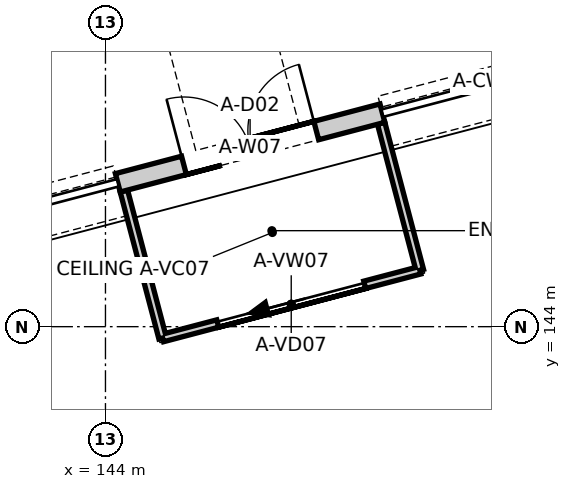
"""IFC4 building model, lengths in metres.
Left out: names, types, materials, properties, quantities, classifications, styles, units other than length and angle.
Written with IfcOpenShell. Run it as: python <this file> out.ifc"""

import sys

from ifc_helpers import new_model, si_unit, direction, frame, frame_2d, origin, place, context, subcontext, project, spatial, polyline, rectangle, outline, extrude, element, fill, save


model = new_model("IFC4")
c1 = context("Model", 3, precision=1e-05, world=origin(), true_north=direction((0.0, 1.0)))
c2 = subcontext(c1, "Body", "Model", "MODEL_VIEW")
j1 = project(units=[si_unit("LENGTHUNIT", "METRE"), si_unit("PLANEANGLEUNIT", "RADIAN")], contexts=[c1])
p1 = place(None, origin())
s1 = spatial("IfcSite", under=j1, at=p1, CompositionType="ELEMENT")
p2 = place(p1, origin())
s2 = spatial("IfcBuilding", under=s1, at=p2, CompositionType="ELEMENT")
p3 = place(p2, origin())
s3 = spatial("IfcBuildingStorey", under=s2, at=p3, CompositionType="ELEMENT", Elevation=0.0)
p4 = place(p3, frame((147.644, 146.809, 0.0), z_axis=(0.0, 0.0, 1.0), x_axis=(-0.967051693888, -0.254580088279, 0.0)))
e1 = element("IfcWall", 1, at=p4, inside=s3, PredefinedType="SOLIDWALL", context=c2, shape_type="SweptSolid", body=[
    extrude(rectangle(XDim=3.6, YDim=0.25, at=frame_2d((1.8, 0.0))), origin(), (0.0, 0.0, 1.0), 4.338),
])
p5 = place(p4, frame((0.9, 0.0, 0.0)))
e2 = element("IfcOpeningElement", 2, at=p5, cuts=e1, PredefinedType="OPENING", context=c2, shape_type="SweptSolid", body=[
    extrude(rectangle(XDim=1.8, YDim=2.4, at=frame_2d((0.9, 1.2))), frame((0.0, 0.135, 0.0), z_axis=(0.0, -1.0, 0.0), x_axis=(1.0, 0.0, 0.0)), (0.0, 0.0, 1.0), 0.27),
])
p6 = place(p3, frame((147.627, 146.676, 0.0), z_axis=(0.0, 0.0, 1.0), x_axis=(0.254637503204, -0.967036577365, 0.0)))
e3 = element("IfcWall", 3, at=p6, inside=s3, PredefinedType="PARTITIONING", context=c2, shape_type="SweptSolid", body=[
    extrude(outline(polyline([(0.0, -0.05), (1.95, -0.05), (2.05, 0.05), (0.0, 0.05), (0.0, -0.05)])), origin(), (0.0, 0.0, 1.0), 3.0),
])
p7 = place(p3, frame((148.136, 144.741, 0.0), z_axis=(0.0, 0.0, 1.0), x_axis=(-0.967047425918, -0.254596300101, 0.0)))
e4 = element("IfcWall", 4, at=p7, inside=s3, PredefinedType="PARTITIONING", context=c2, shape_type="SweptSolid", body=[
    extrude(outline(polyline([(0.05, -0.05), (3.45, -0.05), (3.55, 0.05), (-0.05, 0.05), (0.05, -0.05)])), origin(), (0.0, 0.0, 1.0), 3.0),
])
p8 = place(p7, frame((0.75, 0.0, 0.0)))
e5 = element("IfcOpeningElement", 5, at=p8, cuts=e4, PredefinedType="OPENING", context=c2, shape_type="SweptSolid", body=[
    extrude(rectangle(XDim=2.0, YDim=2.4, at=frame_2d((1.0, 1.2))), frame((0.0, 0.06, 0.0), z_axis=(0.0, -1.0, 0.0), x_axis=(1.0, 0.0, 0.0)), (0.0, 0.0, 1.0), 0.12),
])
p9 = place(p3, frame((144.752, 143.85, 0.0), z_axis=(0.0, 0.0, 1.0), x_axis=(-0.254637503204, 0.967036577365, 0.0)))
e6 = element("IfcWall", 6, at=p9, inside=s3, PredefinedType="PARTITIONING", context=c2, shape_type="SweptSolid", body=[
    extrude(outline(polyline([(0.05, -0.05), (2.0, -0.05), (2.0, 0.05), (-0.05, 0.05), (0.05, -0.05)])), origin(), (0.0, 0.0, 1.0), 3.0),
])
p10 = place(p5, frame((1.8, 0.0, 0.0), z_axis=(0.0, 0.0, 1.0), x_axis=(-1.0, 0.0, 0.0)))
e7 = element("IfcDoor", 7, at=p10, inside=s3, OperationType="DOUBLE_DOOR_SINGLE_SWING", PredefinedType="DOOR", context=c2, shape_type="SweptSolid", body=[
    extrude(rectangle(XDim=1.8, YDim=2.4, at=frame_2d((0.9, 1.2))), frame((0.0, 0.025, 0.0), z_axis=(0.0, -1.0, 0.0), x_axis=(1.0, 0.0, 0.0)), (0.0, 0.0, 1.0), 0.05),
])
fill(e2, e7)
p11 = place(p8, origin())
e8 = element("IfcDoor", 8, at=p11, inside=s3, OperationType="DOUBLE_DOOR_SLIDING", PredefinedType="DOOR", context=c2, shape_type="SweptSolid", body=[
    extrude(rectangle(XDim=2.0, YDim=2.4, at=frame_2d((1.0, 1.2))), frame((0.0, 0.025, 0.0), z_axis=(0.0, -1.0, 0.0), x_axis=(1.0, 0.0, 0.0)), (0.0, 0.0, 1.0), 0.05),
])
fill(e5, e8)
save(model, sys.argv[1])
